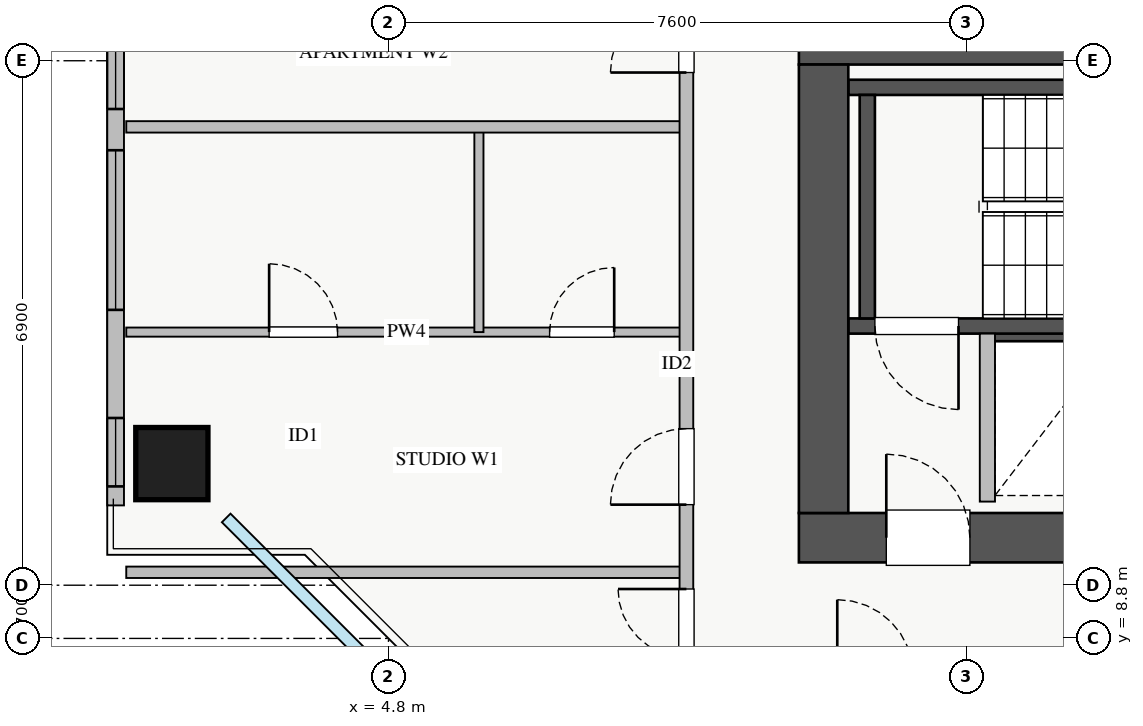
"""IFC4 building model, lengths in metres.
Left out: names, types, materials, properties, quantities, classifications, styles, units other than length and angle.
Written with IfcOpenShell. Run it as: python <this file> out.ifc"""

import sys

from ifc_helpers import new_model, si_unit, direction, frame, frame_2d, origin, origin_2d, place, context, subcontext, project, spatial, rectangle, extrude, source, transform, mapped, element, fill, save


model = new_model("IFC4")
c1 = context("Model", 3, precision=1e-05, world=origin(), true_north=direction((0.0, 1.0)))
c2 = subcontext(c1, "Body", "Model", "MODEL_VIEW")
j1 = project(units=[si_unit("LENGTHUNIT", "METRE"), si_unit("PLANEANGLEUNIT", "RADIAN")], contexts=[c1])
p1 = place(None, origin())
s1 = spatial("IfcSite", under=j1, at=p1, CompositionType="ELEMENT")
p2 = place(p1, origin())
s2 = spatial("IfcBuilding", under=s1, at=p2, CompositionType="ELEMENT")
p3 = place(p2, frame((0.0, 0.0, 182.75)))
s3 = spatial("IfcBuildingStorey", under=s2, at=p3, CompositionType="ELEMENT", Elevation=182.75)
p4 = place(p3, frame((12.68, 12.8, 0.0), z_axis=(0.0, 0.0, 1.0), x_axis=(1.0, 0.0, 0.0)))
e1 = element("IfcWall", 1, at=p4, inside=s3, PredefinedType="SHEAR", context=c2, shape_type="SweptSolid", body=[
    extrude(rectangle(XDim=1.94, YDim=0.18, at=frame_2d((0.97, 0.0))), origin(), (0.0, 0.0, 1.0), 3.03),
])
p5 = place(p3, frame((10.85, 12.91, 0.0), z_axis=(0.0, 0.0, 1.0), x_axis=(1.0, 0.0, 0.0)))
e2 = element("IfcWall", 2, at=p5, inside=s3, PredefinedType="SHEAR", context=c2, shape_type="SweptSolid", body=[
    extrude(rectangle(XDim=7.3, YDim=0.2, at=frame_2d((3.65, 0.0))), origin(), (0.0, 0.0, 1.0), 3.25),
])
p6 = place(p5, frame((0.35, 0.0, 0.0)))
e3 = element("IfcOpeningElement", 3, at=p6, cuts=e2, PredefinedType="OPENING", context=c2, shape_type="SweptSolid", body=[
    extrude(rectangle(XDim=1.1, YDim=2.05, at=frame_2d((0.55, 1.025))), frame((0.0, 0.11, 0.0), z_axis=(0.0, -1.0, 0.0), x_axis=(1.0, 0.0, 0.0)), (0.0, 0.0, 1.0), 0.22),
])
p7 = place(p3, frame((10.85, 16.05, 0.0), z_axis=(0.0, 0.0, 1.0), x_axis=(1.0, 0.0, 0.0)))
e4 = element("IfcWall", 4, at=p7, inside=s3, PredefinedType="SHEAR", context=c2, shape_type="SweptSolid", body=[
    extrude(rectangle(XDim=7.3, YDim=0.2, at=frame_2d((3.65, 0.0))), origin(), (0.0, 0.0, 1.0), 3.25),
])
p8 = place(p3, frame((11.1, 13.01, 0.0), z_axis=(0.0, 0.0, 1.0), x_axis=(0.0, 1.0, 0.0)))
e5 = element("IfcWall", 5, at=p8, inside=s3, PredefinedType="SHEAR", context=c2, shape_type="SweptSolid", body=[
    extrude(rectangle(XDim=2.94, YDim=0.2, at=frame_2d((1.47, 0.0))), origin(), (0.0, 0.0, 1.0), 3.25),
])
p9 = place(p3, frame((10.2, 10.125, 0.0), z_axis=(0.0, 0.0, 1.0), x_axis=(1.0, 0.0, 0.0)))
e6 = element("IfcWall", 6, at=p9, inside=s3, PredefinedType="SHEAR", context=c2, shape_type="SweptSolid", body=[
    extrude(rectangle(XDim=17.6, YDim=0.65, at=frame_2d((8.8, 0.0))), origin(), (0.0, 0.0, 1.0), 3.25),
])
p10 = place(p9, frame((1.15, 0.0, 0.0)))
e7 = element("IfcOpeningElement", 7, at=p10, cuts=e6, PredefinedType="OPENING", context=c2, shape_type="SweptSolid", body=[
    extrude(rectangle(XDim=1.1, YDim=2.05, at=frame_2d((0.55, 1.025))), frame((0.0, 0.335, 0.0), z_axis=(0.0, -1.0, 0.0), x_axis=(1.0, 0.0, 0.0)), (0.0, 0.0, 1.0), 0.67),
])
p11 = place(p9, frame((8.3, 0.0, 0.0)))
e8 = element("IfcOpeningElement", 8, at=p11, cuts=e6, PredefinedType="OPENING", context=c2, shape_type="SweptSolid", body=[
    extrude(rectangle(XDim=1.1, YDim=2.05, at=frame_2d((0.55, 1.025))), frame((0.0, 0.335, 0.0), z_axis=(0.0, -1.0, 0.0), x_axis=(1.0, 0.0, 0.0)), (0.0, 0.0, 1.0), 0.67),
])
p12 = place(p9, frame((4.9, 0.0, 0.0)))
e9 = element("IfcOpeningElement", 9, at=p12, cuts=e6, PredefinedType="OPENING", context=c2, shape_type="SweptSolid", body=[
    extrude(rectangle(XDim=1.1, YDim=2.05, at=frame_2d((0.55, 1.025))), frame((0.0, 0.335, 0.0), z_axis=(0.0, -1.0, 0.0), x_axis=(1.0, 0.0, 0.0)), (0.0, 0.0, 1.0), 0.67),
])
p13 = place(p9, frame((14.74, 0.0, 0.0)))
e10 = element("IfcOpeningElement", 10, at=p13, cuts=e6, PredefinedType="OPENING", context=c2, shape_type="SweptSolid", body=[
    extrude(rectangle(XDim=1.0, YDim=2.05, at=frame_2d((0.5, 1.025))), frame((0.0, 0.335, 0.0), z_axis=(0.0, -1.0, 0.0), x_axis=(1.0, 0.0, 0.0)), (0.0, 0.0, 1.0), 0.67),
])
p14 = place(p9, frame((10.155, 0.0, 0.0)))
e11 = element("IfcOpeningElement", 11, at=p14, cuts=e6, PredefinedType="OPENING", context=c2, shape_type="SweptSolid", body=[
    extrude(rectangle(XDim=1.0, YDim=2.05, at=frame_2d((0.5, 1.025))), frame((0.0, 0.335, 0.0), z_axis=(0.0, -1.0, 0.0), x_axis=(1.0, 0.0, 0.0)), (0.0, 0.0, 1.0), 0.67),
])
p15 = place(p9, frame((11.87, 0.0, 0.0)))
e12 = element("IfcOpeningElement", 12, at=p15, cuts=e6, PredefinedType="OPENING", context=c2, shape_type="SweptSolid", body=[
    extrude(rectangle(XDim=1.0, YDim=2.05, at=frame_2d((0.5, 1.025))), frame((0.0, 0.335, 0.0), z_axis=(0.0, -1.0, 0.0), x_axis=(1.0, 0.0, 0.0)), (0.0, 0.0, 1.0), 0.67),
])
p16 = place(p9, frame((13.46, 0.0, 0.0)))
e13 = element("IfcOpeningElement", 13, at=p16, cuts=e6, PredefinedType="OPENING", context=c2, shape_type="SweptSolid", body=[
    extrude(rectangle(XDim=1.0, YDim=2.05, at=frame_2d((0.5, 1.025))), frame((0.0, 0.335, 0.0), z_axis=(0.0, -1.0, 0.0), x_axis=(1.0, 0.0, 0.0)), (0.0, 0.0, 1.0), 0.67),
])
p17 = place(p3, frame((10.2, 16.675, 0.0), z_axis=(0.0, 0.0, 1.0), x_axis=(1.0, 0.0, 0.0)))
e14 = element("IfcWall", 14, at=p17, inside=s3, PredefinedType="SHEAR", context=c2, shape_type="SweptSolid", body=[
    extrude(rectangle(XDim=17.6, YDim=0.65, at=frame_2d((8.8, 0.0))), origin(), (0.0, 0.0, 1.0), 3.25),
])
p18 = place(p3, frame((10.525, 10.45, 0.0), z_axis=(0.0, 0.0, 1.0), x_axis=(0.0, 1.0, 0.0)))
e15 = element("IfcWall", 15, at=p18, inside=s3, PredefinedType="SHEAR", context=c2, shape_type="SweptSolid", body=[
    extrude(rectangle(XDim=5.9, YDim=0.65, at=frame_2d((2.95, 0.0))), origin(), (0.0, 0.0, 1.0), 3.25),
])
m1 = source(origin(), c2, "Body", "SweptSolid", [
    extrude(rectangle(XDim=0.95, YDim=0.95, at=origin_2d()), origin(), (0.0, 0.0, 1.0), 3.25),
])
p19 = place(p3, frame((1.95, 11.1, 0.0), z_axis=(0.0, 0.0, 1.0), x_axis=(1.0, 0.0, 0.0)))
e16 = element("IfcColumn", 16, at=p19, inside=s3, PredefinedType="COLUMN", context=c2, shape_type="MappedRepresentation", body=[
    mapped(m1, transform((0.0, 0.0, 0.0), x_axis=(1.0, 0.0, 0.0), y_axis=(0.0, 1.0, 0.0), z_axis=(0.0, 0.0, 1.0), scale=1.0)),
])
p20 = place(p3, frame((1.21, 10.55, 0.0), z_axis=(0.0, 0.0, 1.0), x_axis=(0.0, 1.0, 0.0)))
e17 = element("IfcWall", 17, at=p20, inside=s3, PredefinedType="STANDARD", context=c2, shape_type="SweptSolid", body=[
    extrude(rectangle(XDim=24.9, YDim=0.22, at=frame_2d((12.45, 0.0))), origin(), (0.0, 0.0, 1.0), 2.57),
])
p21 = place(p20, frame((13.3, 0.0, 0.0)))
e18 = element("IfcOpeningElement", 18, at=p21, cuts=e17, PredefinedType="OPENING", context=c2, shape_type="SweptSolid", body=[
    extrude(rectangle(XDim=1.2, YDim=2.1, at=frame_2d((0.6, 1.05))), frame((0.0, 0.12, 0.0), z_axis=(0.0, -1.0, 0.0), x_axis=(1.0, 0.0, 0.0)), (0.0, 0.0, 1.0), 0.24),
])
p22 = place(p20, frame((2.573, 0.0, 0.9)))
e19 = element("IfcOpeningElement", 19, at=p22, cuts=e17, PredefinedType="OPENING", context=c2, shape_type="SweptSolid", body=[
    extrude(rectangle(XDim=2.1, YDim=1.5, at=frame_2d((1.05, 0.75))), frame((0.0, 0.12, 0.0), z_axis=(0.0, -1.0, 0.0), x_axis=(1.0, 0.0, 0.0)), (0.0, 0.0, 1.0), 0.24),
])
p23 = place(p20, frame((19.387, 0.0, 0.9)))
e20 = element("IfcOpeningElement", 20, at=p23, cuts=e17, PredefinedType="OPENING", context=c2, shape_type="SweptSolid", body=[
    extrude(rectangle(XDim=2.1, YDim=1.5, at=frame_2d((1.05, 0.75))), frame((0.0, 0.12, 0.0), z_axis=(0.0, -1.0, 0.0), x_axis=(1.0, 0.0, 0.0)), (0.0, 0.0, 1.0), 0.24),
])
p24 = place(p20, frame((22.24, 0.0, 0.9)))
e21 = element("IfcOpeningElement", 21, at=p24, cuts=e17, PredefinedType="OPENING", context=c2, shape_type="SweptSolid", body=[
    extrude(rectangle(XDim=2.4, YDim=1.5, at=frame_2d((1.2, 0.75))), frame((0.0, 0.12, 0.0), z_axis=(0.0, -1.0, 0.0), x_axis=(1.0, 0.0, 0.0)), (0.0, 0.0, 1.0), 0.24),
])
p25 = place(p20, frame((0.25, 0.0, 0.9)))
e22 = element("IfcOpeningElement", 22, at=p25, cuts=e17, PredefinedType="OPENING", context=c2, shape_type="SweptSolid", body=[
    extrude(rectangle(XDim=0.9, YDim=1.2, at=frame_2d((0.45, 0.6))), frame((0.0, 0.12, 0.0), z_axis=(0.0, -1.0, 0.0), x_axis=(1.0, 0.0, 0.0)), (0.0, 0.0, 1.0), 0.24),
])
p26 = place(p20, frame((8.01, 0.0, 0.9)))
e23 = element("IfcOpeningElement", 23, at=p26, cuts=e17, PredefinedType="OPENING", context=c2, shape_type="SweptSolid", body=[
    extrude(rectangle(XDim=0.9, YDim=1.2, at=frame_2d((0.45, 0.6))), frame((0.0, 0.12, 0.0), z_axis=(0.0, -1.0, 0.0), x_axis=(1.0, 0.0, 0.0)), (0.0, 0.0, 1.0), 0.24),
])
p27 = place(p20, frame((5.215, 0.0, 0.9)))
e24 = element("IfcOpeningElement", 24, at=p27, cuts=e17, PredefinedType="OPENING", context=c2, shape_type="SweptSolid", body=[
    extrude(rectangle(XDim=0.9, YDim=1.2, at=frame_2d((0.45, 0.6))), frame((0.0, 0.12, 0.0), z_axis=(0.0, -1.0, 0.0), x_axis=(1.0, 0.0, 0.0)), (0.0, 0.0, 1.0), 0.24),
])
p28 = place(p3, frame((12.68, 10.6, 0.0), z_axis=(0.0, 0.0, 1.0), x_axis=(0.0, 1.0, 0.0)))
e25 = element("IfcWall", 25, at=p28, inside=s3, PredefinedType="PARTITIONING", context=c2, shape_type="SweptSolid", body=[
    extrude(rectangle(XDim=2.21, YDim=0.2, at=frame_2d((1.105, 0.0))), origin(), (0.0, 0.0, 1.0), 3.03),
])
p29 = place(p3, frame((1.35, 9.67, 0.0), z_axis=(0.0, 0.0, 1.0), x_axis=(1.0, 0.0, 0.0)))
e26 = element("IfcWall", 26, at=p29, inside=s3, PredefinedType="PARTITIONING", context=c2, shape_type="SweptSolid", body=[
    extrude(rectangle(XDim=7.37, YDim=0.15, at=frame_2d((3.685, 0.0))), origin(), (0.0, 0.0, 1.0), 3.03),
])
p30 = place(p3, frame((1.35, 12.83, 0.0), z_axis=(0.0, 0.0, 1.0), x_axis=(1.0, 0.0, 0.0)))
e27 = element("IfcWall", 27, at=p30, inside=s3, PredefinedType="PLUMBINGWALL", context=c2, shape_type="SweptSolid", body=[
    extrude(rectangle(XDim=7.37, YDim=0.12, at=frame_2d((3.685, 0.0))), origin(), (0.0, 0.0, 1.0), 3.03),
])
p31 = place(p30, frame((1.88, 0.0, 0.0)))
e28 = element("IfcOpeningElement", 28, at=p31, cuts=e27, PredefinedType="OPENING", context=c2, shape_type="SweptSolid", body=[
    extrude(rectangle(XDim=0.9, YDim=2.05, at=frame_2d((0.45, 1.025))), frame((0.0, 0.07, 0.0), z_axis=(0.0, -1.0, 0.0), x_axis=(1.0, 0.0, 0.0)), (0.0, 0.0, 1.0), 0.14),
])
p32 = place(p30, frame((5.57, 0.0, 0.0)))
e29 = element("IfcOpeningElement", 29, at=p32, cuts=e27, PredefinedType="OPENING", context=c2, shape_type="SweptSolid", body=[
    extrude(rectangle(XDim=0.85, YDim=2.05, at=frame_2d((0.425, 1.025))), frame((0.0, 0.07, 0.0), z_axis=(0.0, -1.0, 0.0), x_axis=(1.0, 0.0, 0.0)), (0.0, 0.0, 1.0), 0.14),
])
p33 = place(p3, frame((5.99, 12.83, 0.0), z_axis=(0.0, 0.0, 1.0), x_axis=(0.0, 1.0, 0.0)))
e30 = element("IfcWall", 30, at=p33, inside=s3, PredefinedType="PLUMBINGWALL", context=c2, shape_type="SweptSolid", body=[
    extrude(rectangle(XDim=2.7, YDim=0.12, at=frame_2d((1.35, 0.0))), origin(), (0.0, 0.0, 1.0), 2.825),
])
p34 = place(p3, frame((1.35, 15.53, 0.0), z_axis=(0.0, 0.0, 1.0), x_axis=(1.0, 0.0, 0.0)))
e31 = element("IfcWall", 31, at=p34, inside=s3, PredefinedType="PARTITIONING", context=c2, shape_type="SweptSolid", body=[
    extrude(rectangle(XDim=7.37, YDim=0.15, at=frame_2d((3.685, 0.0))), origin(), (0.0, 0.0, 1.0), 3.03),
])
p35 = place(p3, frame((8.72, 8.31, 0.0), z_axis=(0.0, 0.0, 1.0), x_axis=(0.0, 1.0, 0.0)))
e32 = element("IfcWall", 32, at=p35, inside=s3, PredefinedType="PARTITIONING", context=c2, shape_type="SweptSolid", body=[
    extrude(rectangle(XDim=29.37, YDim=0.18, at=frame_2d((14.685, 0.0))), origin(), (0.0, 0.0, 1.0), 3.03),
])
p36 = place(p35, frame((28.06, 0.0, 0.0)))
e33 = element("IfcOpeningElement", 33, at=p36, cuts=e32, PredefinedType="OPENING", context=c2, shape_type="SweptSolid", body=[
    extrude(rectangle(XDim=0.9, YDim=2.05, at=frame_2d((0.45, 1.025))), frame((0.0, 0.1, 0.0), z_axis=(0.0, -1.0, 0.0), x_axis=(1.0, 0.0, 0.0)), (0.0, 0.0, 1.0), 0.2),
])
p37 = place(p35, frame((0.24, 0.0, 0.0)))
e34 = element("IfcOpeningElement", 34, at=p37, cuts=e32, PredefinedType="OPENING", context=c2, shape_type="SweptSolid", body=[
    extrude(rectangle(XDim=0.9, YDim=2.05, at=frame_2d((0.45, 1.025))), frame((0.0, 0.1, 0.0), z_axis=(0.0, -1.0, 0.0), x_axis=(1.0, 0.0, 0.0)), (0.0, 0.0, 1.0), 0.2),
])
p38 = place(p35, frame((2.25, 0.0, 0.0)))
e35 = element("IfcOpeningElement", 35, at=p38, cuts=e32, PredefinedType="OPENING", context=c2, shape_type="SweptSolid", body=[
    extrude(rectangle(XDim=1.0, YDim=2.05, at=frame_2d((0.5, 1.025))), frame((0.0, 0.1, 0.0), z_axis=(0.0, -1.0, 0.0), x_axis=(1.0, 0.0, 0.0)), (0.0, 0.0, 1.0), 0.2),
])
p39 = place(p35, frame((7.935, 0.0, 0.0)))
e36 = element("IfcOpeningElement", 36, at=p39, cuts=e32, PredefinedType="OPENING", context=c2, shape_type="SweptSolid", body=[
    extrude(rectangle(XDim=1.0, YDim=2.05, at=frame_2d((0.5, 1.025))), frame((0.0, 0.1, 0.0), z_axis=(0.0, -1.0, 0.0), x_axis=(1.0, 0.0, 0.0)), (0.0, 0.0, 1.0), 0.2),
])
p40 = place(p35, frame((17.3, 0.0, 0.0)))
e37 = element("IfcOpeningElement", 37, at=p40, cuts=e32, PredefinedType="OPENING", context=c2, shape_type="SweptSolid", body=[
    extrude(rectangle(XDim=1.0, YDim=2.05, at=frame_2d((0.5, 1.025))), frame((0.0, 0.1, 0.0), z_axis=(0.0, -1.0, 0.0), x_axis=(1.0, 0.0, 0.0)), (0.0, 0.0, 1.0), 0.2),
])
p41 = place(p35, frame((21.98, 0.0, 0.0)))
e38 = element("IfcOpeningElement", 38, at=p41, cuts=e32, PredefinedType="OPENING", context=c2, shape_type="SweptSolid", body=[
    extrude(rectangle(XDim=1.0, YDim=2.05, at=frame_2d((0.5, 1.025))), frame((0.0, 0.1, 0.0), z_axis=(0.0, -1.0, 0.0), x_axis=(1.0, 0.0, 0.0)), (0.0, 0.0, 1.0), 0.2),
])
m2 = source(origin(), c2, "Body", "SweptSolid", [
    extrude(rectangle(XDim=2.1, YDim=1.5, at=frame_2d((1.05, 0.75))), frame((0.0, 0.03, 0.0), z_axis=(0.0, -1.0, 0.0), x_axis=(1.0, 0.0, 0.0)), (0.0, 0.0, 1.0), 0.06),
])
p42 = place(p22, origin())
e39 = element("IfcWindow", 39, at=p42, inside=s3, PartitioningType="TRIPLE_PANEL_VERTICAL", PredefinedType="WINDOW", context=c2, shape_type="MappedRepresentation", body=[
    mapped(m2, transform((0.0, 0.0, 0.0), x_axis=(1.0, 0.0, 0.0), y_axis=(0.0, 1.0, 0.0), z_axis=(0.0, 0.0, 1.0), scale=1.0)),
])
fill(e19, e39)
m3 = source(origin(), c2, "Body", "SweptSolid", [
    extrude(rectangle(XDim=1.1, YDim=2.05, at=frame_2d((0.55, 1.025))), frame((0.0, 0.025, 0.0), z_axis=(0.0, -1.0, 0.0), x_axis=(1.0, 0.0, 0.0)), (0.0, 0.0, 1.0), 0.05),
])
p43 = place(p10, origin())
e40 = element("IfcDoor", 40, at=p43, inside=s3, OperationType="SINGLE_SWING_LEFT", PredefinedType="DOOR", context=c2, shape_type="MappedRepresentation", body=[
    mapped(m3, transform((0.0, 0.0, 0.0), x_axis=(1.0, 0.0, 0.0), y_axis=(0.0, 1.0, 0.0), z_axis=(0.0, 0.0, 1.0), scale=1.0)),
])
fill(e7, e40)
p44 = place(p6, frame((1.1, 0.0, 0.0), z_axis=(0.0, 0.0, 1.0), x_axis=(-1.0, 0.0, 0.0)))
e41 = element("IfcDoor", 41, at=p44, inside=s3, OperationType="SINGLE_SWING_RIGHT", PredefinedType="DOOR", context=c2, shape_type="MappedRepresentation", body=[
    mapped(m3, transform((0.0, 0.0, 0.0), x_axis=(1.0, 0.0, 0.0), y_axis=(0.0, 1.0, 0.0), z_axis=(0.0, 0.0, 1.0), scale=1.0)),
])
fill(e3, e41)
m4 = source(origin(), c2, "Body", "SweptSolid", [
    extrude(rectangle(XDim=0.9, YDim=2.05, at=frame_2d((0.45, 1.025))), frame((0.0, 0.025, 0.0), z_axis=(0.0, -1.0, 0.0), x_axis=(1.0, 0.0, 0.0)), (0.0, 0.0, 1.0), 0.05),
])
p45 = place(p31, origin())
e42 = element("IfcDoor", 42, at=p45, inside=s3, OperationType="SINGLE_SWING_LEFT", PredefinedType="DOOR", context=c2, shape_type="MappedRepresentation", body=[
    mapped(m4, transform((0.0, 0.0, 0.0), x_axis=(1.0, 0.0, 0.0), y_axis=(0.0, 1.0, 0.0), z_axis=(0.0, 0.0, 1.0), scale=1.0)),
])
fill(e28, e42)
m5 = source(origin(), c2, "Body", "SweptSolid", [
    extrude(rectangle(XDim=0.85, YDim=2.05, at=frame_2d((0.425, 1.025))), frame((0.0, 0.025, 0.0), z_axis=(0.0, -1.0, 0.0), x_axis=(1.0, 0.0, 0.0)), (0.0, 0.0, 1.0), 0.05),
])
p46 = place(p32, origin())
e43 = element("IfcDoor", 43, at=p46, inside=s3, OperationType="SINGLE_SWING_RIGHT", PredefinedType="DOOR", context=c2, shape_type="MappedRepresentation", body=[
    mapped(m5, transform((0.0, 0.0, 0.0), x_axis=(1.0, 0.0, 0.0), y_axis=(0.0, 1.0, 0.0), z_axis=(0.0, 0.0, 1.0), scale=1.0)),
])
fill(e29, e43)
p47 = place(p37, origin())
e44 = element("IfcDoor", 44, at=p47, inside=s3, OperationType="SINGLE_SWING_RIGHT", PredefinedType="DOOR", context=c2, shape_type="MappedRepresentation", body=[
    mapped(m4, transform((0.0, 0.0, 0.0), x_axis=(1.0, 0.0, 0.0), y_axis=(0.0, 1.0, 0.0), z_axis=(0.0, 0.0, 1.0), scale=1.0)),
])
fill(e34, e44)
m6 = source(origin(), c2, "Body", "SweptSolid", [
    extrude(rectangle(XDim=1.0, YDim=2.05, at=frame_2d((0.5, 1.025))), frame((0.0, 0.025, 0.0), z_axis=(0.0, -1.0, 0.0), x_axis=(1.0, 0.0, 0.0)), (0.0, 0.0, 1.0), 0.05),
])
p48 = place(p38, origin())
e45 = element("IfcDoor", 45, at=p48, inside=s3, OperationType="SINGLE_SWING_LEFT", PredefinedType="DOOR", context=c2, shape_type="MappedRepresentation", body=[
    mapped(m6, transform((0.0, 0.0, 0.0), x_axis=(1.0, 0.0, 0.0), y_axis=(0.0, 1.0, 0.0), z_axis=(0.0, 0.0, 1.0), scale=1.0)),
])
fill(e35, e45)
p49 = place(p39, origin())
e46 = element("IfcDoor", 46, at=p49, inside=s3, OperationType="SINGLE_SWING_LEFT", PredefinedType="DOOR", context=c2, shape_type="MappedRepresentation", body=[
    mapped(m6, transform((0.0, 0.0, 0.0), x_axis=(1.0, 0.0, 0.0), y_axis=(0.0, 1.0, 0.0), z_axis=(0.0, 0.0, 1.0), scale=1.0)),
])
fill(e36, e46)
m7 = source(origin(), c2, "Body", "SweptSolid", [
    extrude(rectangle(XDim=0.9, YDim=1.2, at=frame_2d((0.45, 0.6))), frame((0.0, 0.03, 0.0), z_axis=(0.0, -1.0, 0.0), x_axis=(1.0, 0.0, 0.0)), (0.0, 0.0, 1.0), 0.06),
])
p50 = place(p25, origin())
e47 = element("IfcWindow", 47, at=p50, inside=s3, PartitioningType="SINGLE_PANEL", PredefinedType="WINDOW", context=c2, shape_type="MappedRepresentation", body=[
    mapped(m7, transform((0.0, 0.0, 0.0), x_axis=(1.0, 0.0, 0.0), y_axis=(0.0, 1.0, 0.0), z_axis=(0.0, 0.0, 1.0), scale=1.0)),
])
fill(e22, e47)
p51 = place(p27, origin())
e48 = element("IfcWindow", 48, at=p51, inside=s3, PartitioningType="SINGLE_PANEL", PredefinedType="WINDOW", context=c2, shape_type="MappedRepresentation", body=[
    mapped(m7, transform((0.0, 0.0, 0.0), x_axis=(1.0, 0.0, 0.0), y_axis=(0.0, 1.0, 0.0), z_axis=(0.0, 0.0, 1.0), scale=1.0)),
])
fill(e24, e48)
save(model, sys.argv[1])
